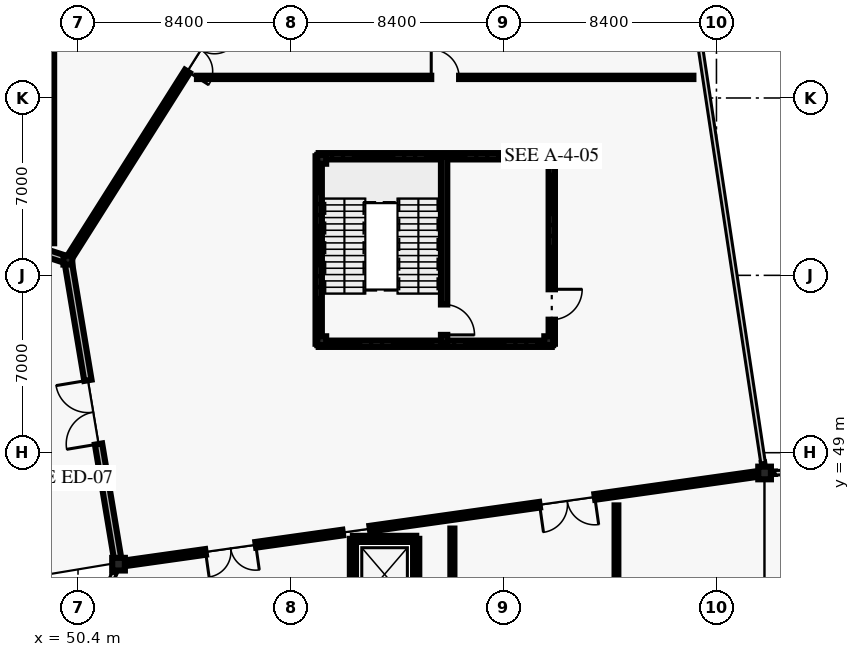
"""IFC4 building model, lengths in metres.
Left out: names, types, materials, properties, quantities, classifications, styles, units other than length and angle.
Written with IfcOpenShell. Run it as: python <this file> out.ifc"""

import sys

from ifc_helpers import new_model, si_unit, direction, frame, frame_2d, origin, origin_2d, place, context, subcontext, project, spatial, rectangle, i_section, extrude, element, fill, save


model = new_model("IFC4")
c1 = context("Model", 3, precision=1e-05, world=origin(), true_north=direction((0.0, 1.0)))
c2 = subcontext(c1, "Body", "Model", "MODEL_VIEW")
j1 = project(units=[si_unit("LENGTHUNIT", "METRE"), si_unit("PLANEANGLEUNIT", "RADIAN")], contexts=[c1])
p1 = place(None, origin())
s1 = spatial("IfcSite", under=j1, at=p1, CompositionType="ELEMENT")
p2 = place(p1, origin())
s2 = spatial("IfcBuilding", under=s1, at=p2, CompositionType="ELEMENT")
p3 = place(p2, origin())
s3 = spatial("IfcBuildingStorey", under=s2, at=p3, CompositionType="ELEMENT", Elevation=0.0)
p4 = place(p3, frame((50.0, 56.6, 0.0), z_axis=(0.0, 0.0, 1.0), x_axis=(1.0, 0.0, 0.0)))
e1 = element("IfcColumn", 1, at=p4, inside=s3, PredefinedType="COLUMN", context=c2, shape_type="SweptSolid", body=[
    extrude(i_section(OverallWidth=0.35, OverallDepth=0.35, WebThickness=0.02, FlangeThickness=0.028, at=origin_2d()), origin(), (0.0, 0.0, 1.0), 5.4),
])
for number, where, z_axis, x_axis in (
    (2, (52.0, 44.6, 0.0), (0.0, 0.0, 1.0), (1.0, 0.0, 0.0)),
    (3, (77.5, 48.2, 0.0), (0.0, 0.0, 1.0), (1.0, 0.0, 0.0)),
):
    element("IfcColumn", number, at=place(p3, frame(where, z_axis=z_axis, x_axis=x_axis)), inside=s3, PredefinedType="COLUMN", context=c2, shape_type="SweptSolid", body=[
        extrude(i_section(OverallWidth=0.5, OverallDepth=0.5, WebThickness=0.022, FlangeThickness=0.036, at=origin_2d()), origin(), (0.0, 0.0, 1.0), 5.4),
    ])
for number, where, z_axis, x_axis in (
    (4, (60.02, 53.42, 0.0), (0.0, 0.0, 1.0), (1.0, 0.0, 0.0)),
    (5, (68.98, 53.42, 0.0), (0.0, 0.0, 1.0), (1.0, 0.0, 0.0)),
    (6, (68.98, 60.58, 0.0), (0.0, 0.0, 1.0), (1.0, 0.0, 0.0)),
    (7, (60.02, 60.58, 0.0), (0.0, 0.0, 1.0), (1.0, 0.0, 0.0)),
):
    element("IfcColumn", number, at=place(p3, frame(where, z_axis=z_axis, x_axis=x_axis)), inside=s3, PredefinedType="COLUMN", context=c2, shape_type="SweptSolid", body=[
        extrude(i_section(OverallWidth=0.35, OverallDepth=0.35, WebThickness=0.02, FlangeThickness=0.028, at=origin_2d()), origin(), (0.0, 0.0, 1.0), 5.4),
    ])
p5 = place(p3, frame((51.825, 44.229, 0.0), z_axis=(0.0, 0.0, 1.0), x_axis=(0.425224932958, 0.905087706463, 0.0)))
e8 = element("IfcWall", 8, at=p5, inside=s3, PredefinedType="SOLIDWALL", context=c2, shape_type="SweptSolid", body=[
    extrude(rectangle(XDim=0.308, YDim=0.095, at=frame_2d((0.154, 0.0))), origin(), (0.0, 0.0, 1.0), 4.22),
])
p6 = place(p3, frame((77.602, 48.202, 0.0), z_axis=(0.0, 0.0, 1.0), x_axis=(0.999735659566, 0.022991541735, 0.0)))
e9 = element("IfcWall", 9, at=p6, inside=s3, PredefinedType="SOLIDWALL", context=c2, shape_type="SweptSolid", body=[
    extrude(rectangle(XDim=0.308, YDim=0.095, at=frame_2d((0.154, 0.0))), origin(), (0.0, 0.0, 1.0), 4.22),
])
p7 = place(p3, frame((51.99, 44.659, 0.0), z_axis=(0.0, 0.0, 1.0), x_axis=(-0.16436940764, 0.986398853321, 0.0)))
e10 = element("IfcWall", 10, at=p7, inside=s3, PredefinedType="SOLIDWALL", context=c2, shape_type="SweptSolid", body=[
    extrude(rectangle(XDim=12.046, YDim=0.29, at=frame_2d((6.023, 0.0))), origin(), (0.0, 0.0, 1.0), 4.22),
])
p8 = place(p7, frame((4.748, 0.0, 0.0)))
e11 = element("IfcOpeningElement", 11, at=p8, cuts=e10, PredefinedType="OPENING", context=c2, shape_type="SweptSolid", body=[
    extrude(rectangle(XDim=2.55, YDim=2.5, at=frame_2d((1.275, 1.25))), frame((0.0, 0.155, 0.0), z_axis=(0.0, -1.0, 0.0), x_axis=(1.0, 0.0, 0.0)), (0.0, 0.0, 1.0), 0.31),
])
p9 = place(p3, frame((77.439, 48.605, 0.0), z_axis=(0.0, 0.0, 1.0), x_axis=(0.15008766182, -0.988672692942, 0.0)))
e12 = element("IfcWall", 12, at=p9, inside=s3, PredefinedType="SOLIDWALL", context=c2, shape_type="SweptSolid", body=[
    extrude(rectangle(XDim=0.307, YDim=0.095, at=frame_2d((0.154, 0.0))), origin(), (0.0, 0.0, 1.0), 4.22),
])
p10 = place(p3, frame((49.943, 56.619, 0.0), z_axis=(0.0, 0.0, 1.0), x_axis=(-0.951074357174, 0.308962080402, 0.0)))
e13 = element("IfcWall", 13, at=p10, inside=s3, PredefinedType="SOLIDWALL", context=c2, shape_type="SweptSolid", body=[
    extrude(rectangle(XDim=24.8, YDim=0.29, at=frame_2d((12.4, 0.0))), origin(), (0.0, 0.0, 1.0), 4.22),
])
p11 = place(p10, frame((11.124, 0.0, 0.0)))
e14 = element("IfcOpeningElement", 14, at=p11, cuts=e13, PredefinedType="OPENING", context=c2, shape_type="SweptSolid", body=[
    extrude(rectangle(XDim=2.55, YDim=2.5, at=frame_2d((1.275, 1.25))), frame((0.0, 0.155, 0.0), z_axis=(0.0, -1.0, 0.0), x_axis=(1.0, 0.0, 0.0)), (0.0, 0.0, 1.0), 0.31),
])
p12 = place(p3, frame((77.5, 48.2, 0.0), z_axis=(0.0, 0.0, 1.0), x_axis=(-0.990181159322, -0.139790098807, 0.0)))
e15 = element("IfcWall", 15, at=p12, inside=s3, PredefinedType="SOLIDWALL", context=c2, shape_type="SweptSolid", body=[
    extrude(rectangle(XDim=15.738, YDim=0.225, at=frame_2d((7.869, 0.0))), origin(), (0.0, 0.0, 1.0), 4.62),
])
p13 = place(p12, frame((6.769, 0.0, 0.0)))
e16 = element("IfcOpeningElement", 16, at=p13, cuts=e15, PredefinedType="OPENING", context=c2, shape_type="SweptSolid", body=[
    extrude(rectangle(XDim=2.2, YDim=2.6, at=frame_2d((1.1, 1.3))), frame((0.0, 0.123, 0.0), z_axis=(0.0, -1.0, 0.0), x_axis=(1.0, 0.0, 0.0)), (0.0, 0.0, 1.0), 0.245),
])
p14 = place(p3, frame((60.85, 45.849, 0.0), z_axis=(0.0, 0.0, 1.0), x_axis=(-0.990187360524, -0.139746166523, 0.0)))
e17 = element("IfcWall", 17, at=p14, inside=s3, PredefinedType="SOLIDWALL", context=c2, shape_type="SweptSolid", body=[
    extrude(rectangle(XDim=8.938, YDim=0.225, at=frame_2d((4.469, 0.0))), origin(), (0.0, 0.0, 1.0), 4.62),
])
p15 = place(p14, frame((3.469, 0.0, 0.0)))
e18 = element("IfcOpeningElement", 18, at=p15, cuts=e17, PredefinedType="OPENING", context=c2, shape_type="SweptSolid", body=[
    extrude(rectangle(XDim=2.0, YDim=2.5, at=frame_2d((1.0, 1.25))), frame((0.0, 0.123, 0.0), z_axis=(0.0, -1.0, 0.0), x_axis=(1.0, 0.0, 0.0)), (0.0, 0.0, 1.0), 0.245),
])
p16 = place(p3, frame((60.5, 73.2, 0.0), z_axis=(0.0, 0.0, 1.0), x_axis=(-0.534570878454, -0.845123645338, 0.0)))
e19 = element("IfcWall", 19, at=p16, inside=s3, PredefinedType="SOLIDWALL", context=c2, shape_type="SweptSolid", body=[
    extrude(rectangle(XDim=19.642, YDim=0.225, at=frame_2d((9.821, 0.0))), origin(), (0.0, 0.0, 1.0), 4.62),
])
p17 = place(p16, frame((8.821, 0.0, 0.0)))
e20 = element("IfcOpeningElement", 20, at=p17, cuts=e19, PredefinedType="OPENING", context=c2, shape_type="SweptSolid", body=[
    extrude(rectangle(XDim=2.0, YDim=2.5, at=frame_2d((1.0, 1.25))), frame((0.0, 0.123, 0.0), z_axis=(0.0, -1.0, 0.0), x_axis=(1.0, 0.0, 0.0)), (0.0, 0.0, 1.0), 0.245),
])
p18 = place(p3, frame((65.177, 40.6, 0.0), z_axis=(0.0, 0.0, 1.0), x_axis=(0.0, 1.0, 0.0)))
e21 = element("IfcWall", 21, at=p18, inside=s3, PredefinedType="PARTITIONING", context=c2, shape_type="SweptSolid", body=[
    extrude(rectangle(XDim=5.406, YDim=0.16, at=frame_2d((2.703, 0.0))), origin(), (0.0, 0.0, 1.0), 3.92),
])
p19 = place(p18, frame((2.213, 0.0, 0.0)))
e22 = element("IfcOpeningElement", 22, at=p19, cuts=e21, PredefinedType="OPENING", context=c2, shape_type="SweptSolid", body=[
    extrude(rectangle(XDim=0.98, YDim=2.15, at=frame_2d((0.49, 1.075))), frame((0.0, 0.09, 0.0), z_axis=(0.0, -1.0, 0.0), x_axis=(1.0, 0.0, 0.0)), (0.0, 0.0, 1.0), 0.18),
])
p20 = place(p3, frame((71.653, 30.691, 0.0), z_axis=(0.0, 0.0, 1.0), x_axis=(0.0, 1.0, 0.0)))
e23 = element("IfcWall", 23, at=p20, inside=s3, PredefinedType="PARTITIONING", context=c2, shape_type="SweptSolid", body=[
    extrude(rectangle(XDim=16.229, YDim=0.15, at=frame_2d((8.115, 0.0))), origin(), (0.0, 0.0, 1.0), 3.92),
])
p21 = place(p20, frame((7.64, 0.0, 0.0)))
e24 = element("IfcOpeningElement", 24, at=p21, cuts=e23, PredefinedType="OPENING", context=c2, shape_type="SweptSolid", body=[
    extrude(rectangle(XDim=0.95, YDim=2.15, at=frame_2d((0.475, 1.075))), frame((0.0, 0.085, 0.0), z_axis=(0.0, -1.0, 0.0), x_axis=(1.0, 0.0, 0.0)), (0.0, 0.0, 1.0), 0.17),
])
p22 = place(p3, frame((55.095, 63.813, 0.0), z_axis=(0.0, 0.0, 1.0), x_axis=(1.0, 0.0, 0.0)))
e25 = element("IfcWall", 25, at=p22, inside=s3, PredefinedType="PARTITIONING", context=c2, shape_type="SweptSolid", body=[
    extrude(rectangle(XDim=19.595, YDim=0.13, at=frame_2d((9.797, 0.0))), origin(), (0.0, 0.0, 1.0), 3.92),
])
p23 = place(p22, frame((9.247, 0.0, 0.0)))
e26 = element("IfcOpeningElement", 26, at=p23, cuts=e25, PredefinedType="OPENING", context=c2, shape_type="SweptSolid", body=[
    extrude(rectangle(XDim=1.1, YDim=2.2, at=frame_2d((0.55, 1.1))), frame((0.0, 0.075, 0.0), z_axis=(0.0, -1.0, 0.0), x_axis=(1.0, 0.0, 0.0)), (0.0, 0.0, 1.0), 0.15),
])
p24 = place(p3, frame((49.403, 57.267, 0.0), z_axis=(0.0, 0.0, 1.0), x_axis=(0.0, 1.0, 0.0)))
e27 = element("IfcWall", 27, at=p24, inside=s3, PredefinedType="PARTITIONING", context=c2, shape_type="SweptSolid", body=[
    extrude(rectangle(XDim=24.53, YDim=0.11, at=frame_2d((12.265, 0.0))), origin(), (0.0, 0.0, 1.0), 3.92),
])
p25 = place(p24, frame((11.79, 0.0, 0.0)))
e28 = element("IfcOpeningElement", 28, at=p25, cuts=e27, PredefinedType="OPENING", context=c2, shape_type="SweptSolid", body=[
    extrude(rectangle(XDim=0.95, YDim=2.15, at=frame_2d((0.475, 1.075))), frame((0.0, 0.065, 0.0), z_axis=(0.0, -1.0, 0.0), x_axis=(1.0, 0.0, 0.0)), (0.0, 0.0, 1.0), 0.13),
])
p26 = place(p3, frame((59.9, 53.3, 0.0), z_axis=(0.0, 0.0, 1.0), x_axis=(0.0, 1.0, 0.0)))
e29 = element("IfcWall", 29, at=p26, inside=s3, PredefinedType="SHEAR", context=c2, shape_type="SweptSolid", body=[
    extrude(rectangle(XDim=7.4, YDim=0.25, at=frame_2d((3.7, 0.0))), origin(), (0.0, 0.0, 1.0), 5.16),
])
for number, where, z_axis, x_axis in (
    (30, (59.9, 60.7, 0.0), (0.0, 0.0, 1.0), (1.0, 0.0, 0.0)),
    (31, (69.1, 53.3, 0.0), (0.0, 0.0, 1.0), (-1.0, 0.0, 0.0)),
):
    element("IfcWall", number, at=place(p3, frame(where, z_axis=z_axis, x_axis=x_axis)), inside=s3, PredefinedType="SHEAR", context=c2, shape_type="SweptSolid", body=[
        extrude(rectangle(XDim=9.2, YDim=0.25, at=frame_2d((4.6, 0.0))), origin(), (0.0, 0.0, 1.0), 5.16),
    ])
p27 = place(p3, frame((69.1, 60.7, 0.0), z_axis=(0.0, 0.0, 1.0), x_axis=(0.0, -1.0, 0.0)))
e32 = element("IfcWall", 32, at=p27, inside=s3, PredefinedType="SHEAR", context=c2, shape_type="SweptSolid", body=[
    extrude(rectangle(XDim=7.4, YDim=0.25, at=frame_2d((3.7, 0.0))), origin(), (0.0, 0.0, 1.0), 5.16),
])
p28 = place(p27, frame((5.25, 0.0, 0.0)))
e33 = element("IfcOpeningElement", 33, at=p28, cuts=e32, PredefinedType="OPENING", context=c2, shape_type="SweptSolid", body=[
    extrude(rectangle(XDim=1.2, YDim=2.2, at=frame_2d((0.6, 1.1))), frame((0.0, 0.135, 0.0), z_axis=(0.0, -1.0, 0.0), x_axis=(1.0, 0.0, 0.0)), (0.0, 0.0, 1.0), 0.27),
])
p29 = place(p3, frame((64.85, 60.7, 0.0), z_axis=(0.0, 0.0, 1.0), x_axis=(0.0, -1.0, 0.0)))
e34 = element("IfcWall", 34, at=p29, inside=s3, PredefinedType="SHEAR", context=c2, shape_type="SweptSolid", body=[
    extrude(rectangle(XDim=7.4, YDim=0.25, at=frame_2d((3.7, 0.0))), origin(), (0.0, 0.0, 1.0), 5.16),
])
p30 = place(p29, frame((5.85, 0.0, 0.0)))
e35 = element("IfcOpeningElement", 35, at=p30, cuts=e34, PredefinedType="OPENING", context=c2, shape_type="SweptSolid", body=[
    extrude(rectangle(XDim=1.2, YDim=2.2, at=frame_2d((0.6, 1.1))), frame((0.0, 0.135, 0.0), z_axis=(0.0, -1.0, 0.0), x_axis=(1.0, 0.0, 0.0)), (0.0, 0.0, 1.0), 0.27),
])
p31 = place(p3, frame((61.25, 45.6, 0.0), z_axis=(0.0, 0.0, 1.0), x_axis=(1.0, 0.0, 0.0)))
e36 = element("IfcWall", 36, at=p31, inside=s3, PredefinedType="SHEAR", context=c2, shape_type="SweptSolid", body=[
    extrude(rectangle(XDim=2.5, YDim=0.24, at=frame_2d((1.25, 0.0))), origin(), (0.0, 0.0, 1.0), 5.16),
])
for number, where, z_axis, x_axis in (
    (37, (63.75, 45.6, 0.0), (0.0, 0.0, 1.0), (0.0, -1.0, 0.0)),
    (38, (61.25, 42.8, 0.0), (0.0, 0.0, 1.0), (0.0, 1.0, 0.0)),
):
    element("IfcWall", number, at=place(p3, frame(where, z_axis=z_axis, x_axis=x_axis)), inside=s3, PredefinedType="SHEAR", context=c2, shape_type="SweptSolid", body=[
        extrude(rectangle(XDim=2.8, YDim=0.24, at=frame_2d((1.4, 0.0))), origin(), (0.0, 0.0, 1.0), 5.16),
    ])
p32 = place(p8, origin())
e39 = element("IfcDoor", 39, at=p32, inside=s3, OperationType="DOUBLE_DOOR_SINGLE_SWING", PredefinedType="DOOR", context=c2, shape_type="SweptSolid", body=[
    extrude(rectangle(XDim=2.55, YDim=2.5, at=frame_2d((1.275, 1.25))), frame((0.0, 0.025, 0.0), z_axis=(0.0, -1.0, 0.0), x_axis=(1.0, 0.0, 0.0)), (0.0, 0.0, 1.0), 0.05),
])
fill(e11, e39)
p33 = place(p13, origin())
e40 = element("IfcDoor", 40, at=p33, inside=s3, OperationType="DOUBLE_DOOR_SINGLE_SWING", PredefinedType="DOOR", context=c2, shape_type="SweptSolid", body=[
    extrude(rectangle(XDim=2.2, YDim=2.6, at=frame_2d((1.1, 1.3))), frame((0.0, 0.025, 0.0), z_axis=(0.0, -1.0, 0.0), x_axis=(1.0, 0.0, 0.0)), (0.0, 0.0, 1.0), 0.05),
])
fill(e16, e40)
p34 = place(p15, origin())
e41 = element("IfcDoor", 41, at=p34, inside=s3, OperationType="DOUBLE_DOOR_SINGLE_SWING", PredefinedType="DOOR", context=c2, shape_type="SweptSolid", body=[
    extrude(rectangle(XDim=2.0, YDim=2.5, at=frame_2d((1.0, 1.25))), frame((0.0, 0.025, 0.0), z_axis=(0.0, -1.0, 0.0), x_axis=(1.0, 0.0, 0.0)), (0.0, 0.0, 1.0), 0.05),
])
fill(e18, e41)
p35 = place(p17, origin())
e42 = element("IfcDoor", 42, at=p35, inside=s3, OperationType="DOUBLE_DOOR_SINGLE_SWING", PredefinedType="DOOR", context=c2, shape_type="SweptSolid", body=[
    extrude(rectangle(XDim=2.0, YDim=2.5, at=frame_2d((1.0, 1.25))), frame((0.0, 0.025, 0.0), z_axis=(0.0, -1.0, 0.0), x_axis=(1.0, 0.0, 0.0)), (0.0, 0.0, 1.0), 0.05),
])
fill(e20, e42)
p36 = place(p23, origin())
e43 = element("IfcDoor", 43, at=p36, inside=s3, OperationType="SINGLE_SWING_LEFT", PredefinedType="DOOR", context=c2, shape_type="SweptSolid", body=[
    extrude(rectangle(XDim=1.1, YDim=2.2, at=frame_2d((0.55, 1.1))), frame((0.0, 0.025, 0.0), z_axis=(0.0, -1.0, 0.0), x_axis=(1.0, 0.0, 0.0)), (0.0, 0.0, 1.0), 0.05),
])
fill(e26, e43)
p37 = place(p28, origin())
e44 = element("IfcDoor", 44, at=p37, inside=s3, OperationType="SINGLE_SWING_LEFT", PredefinedType="DOOR", context=c2, shape_type="SweptSolid", body=[
    extrude(rectangle(XDim=1.2, YDim=2.2, at=frame_2d((0.6, 1.1))), frame((0.0, 0.025, 0.0), z_axis=(0.0, -1.0, 0.0), x_axis=(1.0, 0.0, 0.0)), (0.0, 0.0, 1.0), 0.05),
])
fill(e33, e44)
p38 = place(p30, origin())
e45 = element("IfcDoor", 45, at=p38, inside=s3, OperationType="SINGLE_SWING_RIGHT", PredefinedType="DOOR", context=c2, shape_type="SweptSolid", body=[
    extrude(rectangle(XDim=1.2, YDim=2.2, at=frame_2d((0.6, 1.1))), frame((0.0, 0.025, 0.0), z_axis=(0.0, -1.0, 0.0), x_axis=(1.0, 0.0, 0.0)), (0.0, 0.0, 1.0), 0.05),
])
fill(e35, e45)
save(model, sys.argv[1])
